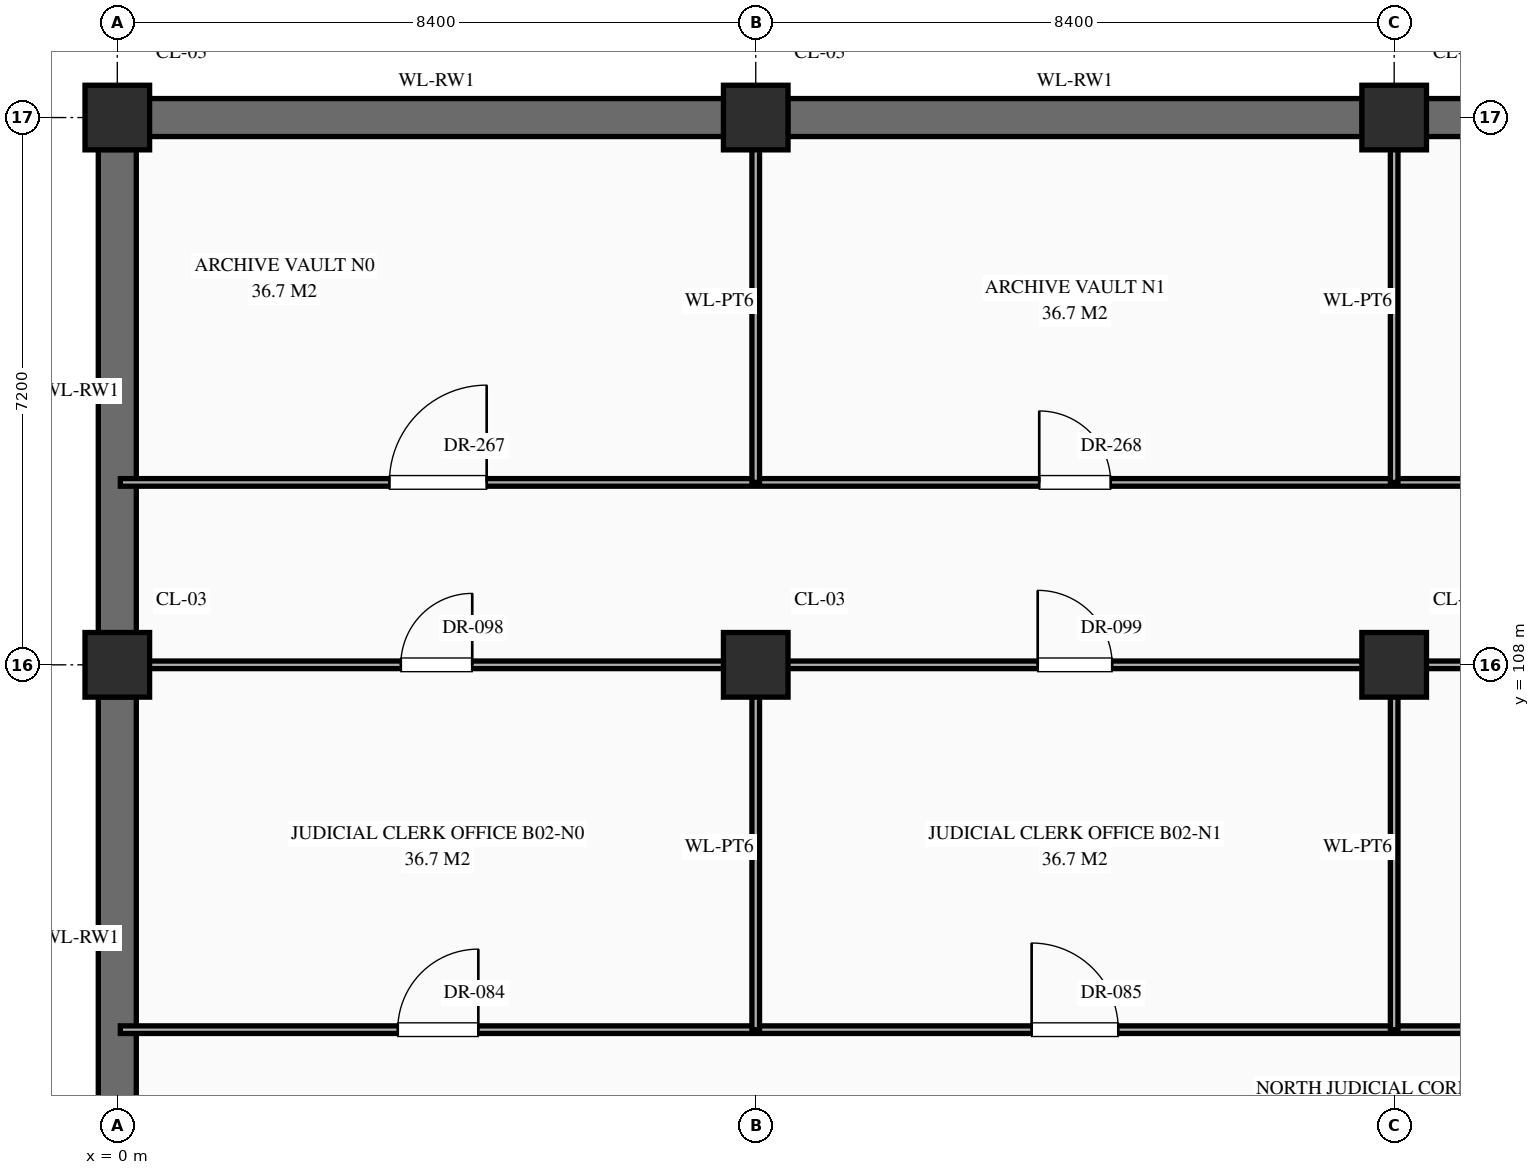
"""IFC4 building model, lengths in metres.
Left out: names, types, materials, properties, quantities, classifications, styles, units other than length and angle.
Written with IfcOpenShell. Run it as: python <this file> out.ifc"""

import sys

from ifc_helpers import new_model, si_unit, direction, frame, frame_2d, origin, origin_2d, place, context, subcontext, project, spatial, rectangle, extrude, element, fill, save


model = new_model("IFC4")
c1 = context("Model", 3, precision=1e-05, world=origin(), true_north=direction((0.0, 1.0)))
c2 = subcontext(c1, "Body", "Model", "MODEL_VIEW")
j1 = project(units=[si_unit("LENGTHUNIT", "METRE"), si_unit("PLANEANGLEUNIT", "RADIAN")], contexts=[c1])
p1 = place(None, origin())
s1 = spatial("IfcSite", under=j1, at=p1, CompositionType="ELEMENT")
p2 = place(p1, origin())
s2 = spatial("IfcBuilding", under=s1, at=p2, CompositionType="ELEMENT")
p3 = place(p2, frame((0.0, 0.0, -10.2)))
s3 = spatial("IfcBuildingStorey", under=s2, at=p3, CompositionType="ELEMENT", Elevation=-10.2)
for number, where, z_axis, x_axis in (
    (1, (0.0, 108.0, 0.0), (0.0, 0.0, 1.0), (1.0, 0.0, 0.0)),
    (2, (0.0, 115.2, 0.0), (0.0, 0.0, 1.0), (1.0, 0.0, 0.0)),
    (3, (8.4, 108.0, 0.0), (0.0, 0.0, 1.0), (1.0, 0.0, 0.0)),
    (4, (8.4, 115.2, 0.0), (0.0, 0.0, 1.0), (1.0, 0.0, 0.0)),
    (5, (16.8, 108.0, 0.0), (0.0, 0.0, 1.0), (1.0, 0.0, 0.0)),
    (6, (16.8, 115.2, 0.0), (0.0, 0.0, 1.0), (1.0, 0.0, 0.0)),
):
    element("IfcColumn", number, at=place(p3, frame(where, z_axis=z_axis, x_axis=x_axis)), inside=s3, PredefinedType="COLUMN", context=c2, shape_type="SweptSolid", body=[
        extrude(rectangle(XDim=0.85, YDim=0.85, at=origin_2d()), origin(), (0.0, 0.0, 1.0), 4.8),
    ])
p4 = place(p3, frame((0.0, 101.22, 0.0), z_axis=(0.0, 0.0, 1.0), x_axis=(0.0, 1.0, 0.0)))
e7 = element("IfcWall", 7, at=p4, inside=s3, PredefinedType="USERDEFINED", context=c2, shape_type="SweptSolid", body=[
    extrude(rectangle(XDim=6.36, YDim=0.5, at=frame_2d((3.18, 0.0))), origin(), (0.0, 0.0, 1.0), 4.48),
])
p5 = place(p3, frame((0.42, 115.2, 0.0), z_axis=(0.0, 0.0, 1.0), x_axis=(1.0, 0.0, 0.0)))
e8 = element("IfcWall", 8, at=p5, inside=s3, PredefinedType="USERDEFINED", context=c2, shape_type="SweptSolid", body=[
    extrude(rectangle(XDim=7.56, YDim=0.5, at=frame_2d((3.78, 0.0))), origin(), (0.0, 0.0, 1.0), 4.48),
])
p6 = place(p3, frame((0.0, 108.42, 0.0), z_axis=(0.0, 0.0, 1.0), x_axis=(0.0, 1.0, 0.0)))
e9 = element("IfcWall", 9, at=p6, inside=s3, PredefinedType="USERDEFINED", context=c2, shape_type="SweptSolid", body=[
    extrude(rectangle(XDim=6.36, YDim=0.5, at=frame_2d((3.18, 0.0))), origin(), (0.0, 0.0, 1.0), 4.48),
])
p7 = place(p3, frame((8.82, 115.2, 0.0), z_axis=(0.0, 0.0, 1.0), x_axis=(1.0, 0.0, 0.0)))
e10 = element("IfcWall", 10, at=p7, inside=s3, PredefinedType="USERDEFINED", context=c2, shape_type="SweptSolid", body=[
    extrude(rectangle(XDim=7.56, YDim=0.5, at=frame_2d((3.78, 0.0))), origin(), (0.0, 0.0, 1.0), 4.48),
])
p8 = place(p3, frame((17.22, 115.2, 0.0), z_axis=(0.0, 0.0, 1.0), x_axis=(1.0, 0.0, 0.0)))
e11 = element("IfcWall", 11, at=p8, inside=s3, PredefinedType="USERDEFINED", context=c2, shape_type="SweptSolid", body=[
    extrude(rectangle(XDim=7.56, YDim=0.5, at=frame_2d((3.78, 0.0))), origin(), (0.0, 0.0, 1.0), 4.48),
])
p9 = place(p3, frame((0.04, 103.2, 0.0), z_axis=(0.0, 0.0, 1.0), x_axis=(1.0, 0.0, 0.0)))
e12 = element("IfcWall", 12, at=p9, inside=s3, PredefinedType="STANDARD", context=c2, shape_type="SweptSolid", body=[
    extrude(rectangle(XDim=41.96, YDim=0.1, at=frame_2d((20.98, 0.0))), origin(), (0.0, 0.0, 1.0), 4.48),
])
p10 = place(p9, frame((3.65, 0.0, 0.0)))
e13 = element("IfcOpeningElement", 13, at=p10, cuts=e12, PredefinedType="OPENING", context=c2, shape_type="SweptSolid", body=[
    extrude(rectangle(XDim=1.06, YDim=2.4, at=frame_2d((0.53, 1.2))), frame((0.0, 0.062, 0.0), z_axis=(0.0, -1.0, 0.0), x_axis=(1.0, 0.0, 0.0)), (0.0, 0.0, 1.0), 0.124),
])
p11 = place(p9, frame((11.99, 0.0, 0.0)))
e14 = element("IfcOpeningElement", 14, at=p11, cuts=e12, PredefinedType="OPENING", context=c2, shape_type="SweptSolid", body=[
    extrude(rectangle(XDim=1.14, YDim=2.4, at=frame_2d((0.57, 1.2))), frame((0.0, 0.062, 0.0), z_axis=(0.0, -1.0, 0.0), x_axis=(1.0, 0.0, 0.0)), (0.0, 0.0, 1.0), 0.124),
])
p12 = place(p9, frame((20.51, 0.0, 0.0)))
e15 = element("IfcOpeningElement", 15, at=p12, cuts=e12, PredefinedType="OPENING", context=c2, shape_type="SweptSolid", body=[
    extrude(rectangle(XDim=0.9, YDim=2.15, at=frame_2d((0.45, 1.075))), frame((0.0, 0.062, 0.0), z_axis=(0.0, -1.0, 0.0), x_axis=(1.0, 0.0, 0.0)), (0.0, 0.0, 1.0), 0.124),
])
p13 = place(p9, frame((28.93, 0.0, 0.0)))
e16 = element("IfcOpeningElement", 16, at=p13, cuts=e12, PredefinedType="OPENING", context=c2, shape_type="SweptSolid", body=[
    extrude(rectangle(XDim=0.86, YDim=2.1, at=frame_2d((0.43, 1.05))), frame((0.0, 0.062, 0.0), z_axis=(0.0, -1.0, 0.0), x_axis=(1.0, 0.0, 0.0)), (0.0, 0.0, 1.0), 0.124),
])
p14 = place(p9, frame((37.3, 0.0, 0.0)))
e17 = element("IfcOpeningElement", 17, at=p14, cuts=e12, PredefinedType="OPENING", context=c2, shape_type="SweptSolid", body=[
    extrude(rectangle(XDim=0.92, YDim=2.15, at=frame_2d((0.46, 1.075))), frame((0.0, 0.062, 0.0), z_axis=(0.0, -1.0, 0.0), x_axis=(1.0, 0.0, 0.0)), (0.0, 0.0, 1.0), 0.124),
])
p15 = place(p3, frame((0.04, 108.0, 0.0), z_axis=(0.0, 0.0, 1.0), x_axis=(1.0, 0.0, 0.0)))
e18 = element("IfcWall", 18, at=p15, inside=s3, PredefinedType="STANDARD", context=c2, shape_type="SweptSolid", body=[
    extrude(rectangle(XDim=41.96, YDim=0.1, at=frame_2d((20.98, 0.0))), origin(), (0.0, 0.0, 1.0), 3.63),
])
p16 = place(p15, frame((3.69, 0.0, 0.0)))
e19 = element("IfcOpeningElement", 19, at=p16, cuts=e18, PredefinedType="OPENING", context=c2, shape_type="SweptSolid", body=[
    extrude(rectangle(XDim=0.94, YDim=2.3, at=frame_2d((0.47, 1.15))), frame((0.0, 0.062, 0.0), z_axis=(0.0, -1.0, 0.0), x_axis=(1.0, 0.0, 0.0)), (0.0, 0.0, 1.0), 0.124),
])
p17 = place(p15, frame((12.07, 0.0, 0.0)))
e20 = element("IfcOpeningElement", 20, at=p17, cuts=e18, PredefinedType="OPENING", context=c2, shape_type="SweptSolid", body=[
    extrude(rectangle(XDim=0.98, YDim=2.35, at=frame_2d((0.49, 1.175))), frame((0.0, 0.062, 0.0), z_axis=(0.0, -1.0, 0.0), x_axis=(1.0, 0.0, 0.0)), (0.0, 0.0, 1.0), 0.124),
])
p18 = place(p15, frame((20.438, 0.0, 0.0)))
e21 = element("IfcOpeningElement", 21, at=p18, cuts=e18, PredefinedType="OPENING", context=c2, shape_type="SweptSolid", body=[
    extrude(rectangle(XDim=1.02, YDim=2.4, at=frame_2d((0.51, 1.2))), frame((0.0, 0.062, 0.0), z_axis=(0.0, -1.0, 0.0), x_axis=(1.0, 0.0, 0.0)), (0.0, 0.0, 1.0), 0.124),
])
p19 = place(p15, frame((28.83, 0.0, 0.0)))
e22 = element("IfcOpeningElement", 22, at=p19, cuts=e18, PredefinedType="OPENING", context=c2, shape_type="SweptSolid", body=[
    extrude(rectangle(XDim=1.06, YDim=2.4, at=frame_2d((0.53, 1.2))), frame((0.0, 0.062, 0.0), z_axis=(0.0, -1.0, 0.0), x_axis=(1.0, 0.0, 0.0)), (0.0, 0.0, 1.0), 0.124),
])
p20 = place(p15, frame((37.19, 0.0, 0.0)))
e23 = element("IfcOpeningElement", 23, at=p20, cuts=e18, PredefinedType="OPENING", context=c2, shape_type="SweptSolid", body=[
    extrude(rectangle(XDim=1.14, YDim=2.4, at=frame_2d((0.57, 1.2))), frame((0.0, 0.062, 0.0), z_axis=(0.0, -1.0, 0.0), x_axis=(1.0, 0.0, 0.0)), (0.0, 0.0, 1.0), 0.124),
])
p21 = place(p3, frame((0.04, 110.4, 0.0), z_axis=(0.0, 0.0, 1.0), x_axis=(1.0, 0.0, 0.0)))
e24 = element("IfcWall", 24, at=p21, inside=s3, PredefinedType="STANDARD", context=c2, shape_type="SweptSolid", body=[
    extrude(rectangle(XDim=167.92, YDim=0.1, at=frame_2d((83.96, 0.0))), origin(), (0.0, 0.0, 1.0), 4.48),
])
p22 = place(p21, frame((3.54, 0.0, 0.0)))
e25 = element("IfcOpeningElement", 25, at=p22, cuts=e24, PredefinedType="OPENING", context=c2, shape_type="SweptSolid", body=[
    extrude(rectangle(XDim=1.28, YDim=2.35, at=frame_2d((0.64, 1.175))), frame((0.0, 0.062, 0.0), z_axis=(0.0, -1.0, 0.0), x_axis=(1.0, 0.0, 0.0)), (0.0, 0.0, 1.0), 0.124),
])
p23 = place(p21, frame((12.09, 0.0, 0.0)))
e26 = element("IfcOpeningElement", 26, at=p23, cuts=e24, PredefinedType="OPENING", context=c2, shape_type="SweptSolid", body=[
    extrude(rectangle(XDim=0.94, YDim=2.3, at=frame_2d((0.47, 1.15))), frame((0.0, 0.062, 0.0), z_axis=(0.0, -1.0, 0.0), x_axis=(1.0, 0.0, 0.0)), (0.0, 0.0, 1.0), 0.124),
])
p24 = place(p21, frame((20.47, 0.0, 0.0)))
e27 = element("IfcOpeningElement", 27, at=p24, cuts=e24, PredefinedType="OPENING", context=c2, shape_type="SweptSolid", body=[
    extrude(rectangle(XDim=0.98, YDim=2.35, at=frame_2d((0.49, 1.175))), frame((0.0, 0.062, 0.0), z_axis=(0.0, -1.0, 0.0), x_axis=(1.0, 0.0, 0.0)), (0.0, 0.0, 1.0), 0.124),
])
p25 = place(p21, frame((28.85, 0.0, 0.0)))
e28 = element("IfcOpeningElement", 28, at=p25, cuts=e24, PredefinedType="OPENING", context=c2, shape_type="SweptSolid", body=[
    extrude(rectangle(XDim=1.02, YDim=2.4, at=frame_2d((0.51, 1.2))), frame((0.0, 0.062, 0.0), z_axis=(0.0, -1.0, 0.0), x_axis=(1.0, 0.0, 0.0)), (0.0, 0.0, 1.0), 0.124),
])
p26 = place(p21, frame((37.23, 0.0, 0.0)))
e29 = element("IfcOpeningElement", 29, at=p26, cuts=e24, PredefinedType="OPENING", context=c2, shape_type="SweptSolid", body=[
    extrude(rectangle(XDim=1.06, YDim=2.4, at=frame_2d((0.53, 1.2))), frame((0.0, 0.062, 0.0), z_axis=(0.0, -1.0, 0.0), x_axis=(1.0, 0.0, 0.0)), (0.0, 0.0, 1.0), 0.124),
])
p27 = place(p21, frame((45.59, 0.0, 0.0)))
e30 = element("IfcOpeningElement", 30, at=p27, cuts=e24, PredefinedType="OPENING", context=c2, shape_type="SweptSolid", body=[
    extrude(rectangle(XDim=1.14, YDim=2.4, at=frame_2d((0.57, 1.2))), frame((0.0, 0.062, 0.0), z_axis=(0.0, -1.0, 0.0), x_axis=(1.0, 0.0, 0.0)), (0.0, 0.0, 1.0), 0.124),
])
p28 = place(p21, frame((54.13, 0.0, 0.0)))
e31 = element("IfcOpeningElement", 31, at=p28, cuts=e24, PredefinedType="OPENING", context=c2, shape_type="SweptSolid", body=[
    extrude(rectangle(XDim=0.86, YDim=2.1, at=frame_2d((0.43, 1.05))), frame((0.0, 0.062, 0.0), z_axis=(0.0, -1.0, 0.0), x_axis=(1.0, 0.0, 0.0)), (0.0, 0.0, 1.0), 0.124),
])
p29 = place(p21, frame((62.5, 0.0, 0.0)))
e32 = element("IfcOpeningElement", 32, at=p29, cuts=e24, PredefinedType="OPENING", context=c2, shape_type="SweptSolid", body=[
    extrude(rectangle(XDim=0.92, YDim=2.15, at=frame_2d((0.46, 1.075))), frame((0.0, 0.062, 0.0), z_axis=(0.0, -1.0, 0.0), x_axis=(1.0, 0.0, 0.0)), (0.0, 0.0, 1.0), 0.124),
])
p30 = place(p21, frame((70.88, 0.0, 0.0)))
e33 = element("IfcOpeningElement", 33, at=p30, cuts=e24, PredefinedType="OPENING", context=c2, shape_type="SweptSolid", body=[
    extrude(rectangle(XDim=0.96, YDim=2.2, at=frame_2d((0.48, 1.1))), frame((0.0, 0.062, 0.0), z_axis=(0.0, -1.0, 0.0), x_axis=(1.0, 0.0, 0.0)), (0.0, 0.0, 1.0), 0.124),
])
p31 = place(p21, frame((79.26, 0.0, 0.0)))
e34 = element("IfcOpeningElement", 34, at=p31, cuts=e24, PredefinedType="OPENING", context=c2, shape_type="SweptSolid", body=[
    extrude(rectangle(XDim=1.0, YDim=2.25, at=frame_2d((0.5, 1.125))), frame((0.0, 0.062, 0.0), z_axis=(0.0, -1.0, 0.0), x_axis=(1.0, 0.0, 0.0)), (0.0, 0.0, 1.0), 0.124),
])
p32 = place(p21, frame((87.62, 0.0, 0.0)))
e35 = element("IfcOpeningElement", 35, at=p32, cuts=e24, PredefinedType="OPENING", context=c2, shape_type="SweptSolid", body=[
    extrude(rectangle(XDim=1.08, YDim=2.25, at=frame_2d((0.54, 1.125))), frame((0.0, 0.062, 0.0), z_axis=(0.0, -1.0, 0.0), x_axis=(1.0, 0.0, 0.0)), (0.0, 0.0, 1.0), 0.124),
])
p33 = place(p21, frame((96.0, 0.0, 0.0)))
e36 = element("IfcOpeningElement", 36, at=p33, cuts=e24, PredefinedType="OPENING", context=c2, shape_type="SweptSolid", body=[
    extrude(rectangle(XDim=1.12, YDim=2.25, at=frame_2d((0.56, 1.125))), frame((0.0, 0.062, 0.0), z_axis=(0.0, -1.0, 0.0), x_axis=(1.0, 0.0, 0.0)), (0.0, 0.0, 1.0), 0.124),
])
p34 = place(p21, frame((104.38, 0.0, 0.0)))
e37 = element("IfcOpeningElement", 37, at=p34, cuts=e24, PredefinedType="OPENING", context=c2, shape_type="SweptSolid", body=[
    extrude(rectangle(XDim=1.16, YDim=2.3, at=frame_2d((0.58, 1.15))), frame((0.0, 0.062, 0.0), z_axis=(0.0, -1.0, 0.0), x_axis=(1.0, 0.0, 0.0)), (0.0, 0.0, 1.0), 0.124),
])
p35 = place(p21, frame((112.76, 0.0, 0.0)))
e38 = element("IfcOpeningElement", 38, at=p35, cuts=e24, PredefinedType="OPENING", context=c2, shape_type="SweptSolid", body=[
    extrude(rectangle(XDim=1.2, YDim=2.35, at=frame_2d((0.6, 1.175))), frame((0.0, 0.062, 0.0), z_axis=(0.0, -1.0, 0.0), x_axis=(1.0, 0.0, 0.0)), (0.0, 0.0, 1.0), 0.124),
])
p36 = place(p21, frame((121.14, 0.0, 0.0)))
e39 = element("IfcOpeningElement", 39, at=p36, cuts=e24, PredefinedType="OPENING", context=c2, shape_type="SweptSolid", body=[
    extrude(rectangle(XDim=1.24, YDim=2.3, at=frame_2d((0.62, 1.15))), frame((0.0, 0.062, 0.0), z_axis=(0.0, -1.0, 0.0), x_axis=(1.0, 0.0, 0.0)), (0.0, 0.0, 1.0), 0.124),
])
p37 = place(p21, frame((129.52, 0.0, 0.0)))
e40 = element("IfcOpeningElement", 40, at=p37, cuts=e24, PredefinedType="OPENING", context=c2, shape_type="SweptSolid", body=[
    extrude(rectangle(XDim=1.28, YDim=2.35, at=frame_2d((0.64, 1.175))), frame((0.0, 0.062, 0.0), z_axis=(0.0, -1.0, 0.0), x_axis=(1.0, 0.0, 0.0)), (0.0, 0.0, 1.0), 0.124),
])
p38 = place(p21, frame((138.09, 0.0, 0.0)))
e41 = element("IfcOpeningElement", 41, at=p38, cuts=e24, PredefinedType="OPENING", context=c2, shape_type="SweptSolid", body=[
    extrude(rectangle(XDim=0.94, YDim=2.3, at=frame_2d((0.47, 1.15))), frame((0.0, 0.062, 0.0), z_axis=(0.0, -1.0, 0.0), x_axis=(1.0, 0.0, 0.0)), (0.0, 0.0, 1.0), 0.124),
])
p39 = place(p21, frame((146.47, 0.0, 0.0)))
e42 = element("IfcOpeningElement", 42, at=p39, cuts=e24, PredefinedType="OPENING", context=c2, shape_type="SweptSolid", body=[
    extrude(rectangle(XDim=0.98, YDim=2.35, at=frame_2d((0.49, 1.175))), frame((0.0, 0.062, 0.0), z_axis=(0.0, -1.0, 0.0), x_axis=(1.0, 0.0, 0.0)), (0.0, 0.0, 1.0), 0.124),
])
p40 = place(p21, frame((154.85, 0.0, 0.0)))
e43 = element("IfcOpeningElement", 43, at=p40, cuts=e24, PredefinedType="OPENING", context=c2, shape_type="SweptSolid", body=[
    extrude(rectangle(XDim=1.02, YDim=2.4, at=frame_2d((0.51, 1.2))), frame((0.0, 0.062, 0.0), z_axis=(0.0, -1.0, 0.0), x_axis=(1.0, 0.0, 0.0)), (0.0, 0.0, 1.0), 0.124),
])
p41 = place(p21, frame((163.21, 0.0, 0.0)))
e44 = element("IfcOpeningElement", 44, at=p41, cuts=e24, PredefinedType="OPENING", context=c2, shape_type="SweptSolid", body=[
    extrude(rectangle(XDim=1.06, YDim=2.4, at=frame_2d((0.53, 1.2))), frame((0.0, 0.062, 0.0), z_axis=(0.0, -1.0, 0.0), x_axis=(1.0, 0.0, 0.0)), (0.0, 0.0, 1.0), 0.124),
])
p42 = place(p3, frame((8.4, 103.2, 0.0), z_axis=(0.0, 0.0, 1.0), x_axis=(0.0, 1.0, 0.0)))
e45 = element("IfcWall", 45, at=p42, inside=s3, PredefinedType="STANDARD", context=c2, shape_type="SweptSolid", body=[
    extrude(rectangle(XDim=4.8, YDim=0.1, at=frame_2d((2.4, 0.0))), origin(), (0.0, 0.0, 1.0), 3.73),
])
p43 = place(p3, frame((8.4, 110.4, 0.0), z_axis=(0.0, 0.0, 1.0), x_axis=(0.0, 1.0, 0.0)))
e46 = element("IfcWall", 46, at=p43, inside=s3, PredefinedType="STANDARD", context=c2, shape_type="SweptSolid", body=[
    extrude(rectangle(XDim=4.76, YDim=0.1, at=frame_2d((2.38, 0.0))), origin(), (0.0, 0.0, 1.0), 3.73),
])
p44 = place(p3, frame((16.8, 103.2, 0.0), z_axis=(0.0, 0.0, 1.0), x_axis=(0.0, 1.0, 0.0)))
e47 = element("IfcWall", 47, at=p44, inside=s3, PredefinedType="STANDARD", context=c2, shape_type="SweptSolid", body=[
    extrude(rectangle(XDim=4.8, YDim=0.1, at=frame_2d((2.4, 0.0))), origin(), (0.0, 0.0, 1.0), 3.73),
])
p45 = place(p3, frame((16.8, 110.4, 0.0), z_axis=(0.0, 0.0, 1.0), x_axis=(0.0, 1.0, 0.0)))
e48 = element("IfcWall", 48, at=p45, inside=s3, PredefinedType="STANDARD", context=c2, shape_type="SweptSolid", body=[
    extrude(rectangle(XDim=4.76, YDim=0.1, at=frame_2d((2.38, 0.0))), origin(), (0.0, 0.0, 1.0), 3.73),
])
p46 = place(p10, origin())
e49 = element("IfcDoor", 49, at=p46, inside=s3, OperationType="SINGLE_SWING_RIGHT", PredefinedType="DOOR", context=c2, shape_type="SweptSolid", body=[
    extrude(rectangle(XDim=1.06, YDim=2.4, at=frame_2d((0.53, 1.2))), frame((0.0, 0.025, 0.0), z_axis=(0.0, -1.0, 0.0), x_axis=(1.0, 0.0, 0.0)), (0.0, 0.0, 1.0), 0.05),
])
fill(e13, e49)
p47 = place(p11, origin())
e50 = element("IfcDoor", 50, at=p47, inside=s3, OperationType="SINGLE_SWING_LEFT", PredefinedType="DOOR", context=c2, shape_type="SweptSolid", body=[
    extrude(rectangle(XDim=1.14, YDim=2.4, at=frame_2d((0.57, 1.2))), frame((0.0, 0.025, 0.0), z_axis=(0.0, -1.0, 0.0), x_axis=(1.0, 0.0, 0.0)), (0.0, 0.0, 1.0), 0.05),
])
fill(e14, e50)
p48 = place(p16, origin())
e51 = element("IfcDoor", 51, at=p48, inside=s3, OperationType="SINGLE_SWING_RIGHT", PredefinedType="DOOR", context=c2, shape_type="SweptSolid", body=[
    extrude(rectangle(XDim=0.94, YDim=2.3, at=frame_2d((0.47, 1.15))), frame((0.0, 0.025, 0.0), z_axis=(0.0, -1.0, 0.0), x_axis=(1.0, 0.0, 0.0)), (0.0, 0.0, 1.0), 0.05),
])
fill(e19, e51)
p49 = place(p17, origin())
e52 = element("IfcDoor", 52, at=p49, inside=s3, OperationType="SINGLE_SWING_LEFT", PredefinedType="DOOR", context=c2, shape_type="SweptSolid", body=[
    extrude(rectangle(XDim=0.98, YDim=2.35, at=frame_2d((0.49, 1.175))), frame((0.0, 0.025, 0.0), z_axis=(0.0, -1.0, 0.0), x_axis=(1.0, 0.0, 0.0)), (0.0, 0.0, 1.0), 0.05),
])
fill(e20, e52)
p50 = place(p22, origin())
e53 = element("IfcDoor", 53, at=p50, inside=s3, OperationType="SINGLE_SWING_RIGHT", PredefinedType="DOOR", context=c2, shape_type="SweptSolid", body=[
    extrude(rectangle(XDim=1.28, YDim=2.35, at=frame_2d((0.64, 1.175))), frame((0.0, 0.025, 0.0), z_axis=(0.0, -1.0, 0.0), x_axis=(1.0, 0.0, 0.0)), (0.0, 0.0, 1.0), 0.05),
])
fill(e25, e53)
p51 = place(p23, origin())
e54 = element("IfcDoor", 54, at=p51, inside=s3, OperationType="SINGLE_SWING_LEFT", PredefinedType="DOOR", context=c2, shape_type="SweptSolid", body=[
    extrude(rectangle(XDim=0.94, YDim=2.3, at=frame_2d((0.47, 1.15))), frame((0.0, 0.025, 0.0), z_axis=(0.0, -1.0, 0.0), x_axis=(1.0, 0.0, 0.0)), (0.0, 0.0, 1.0), 0.05),
])
fill(e26, e54)
save(model, sys.argv[1])
